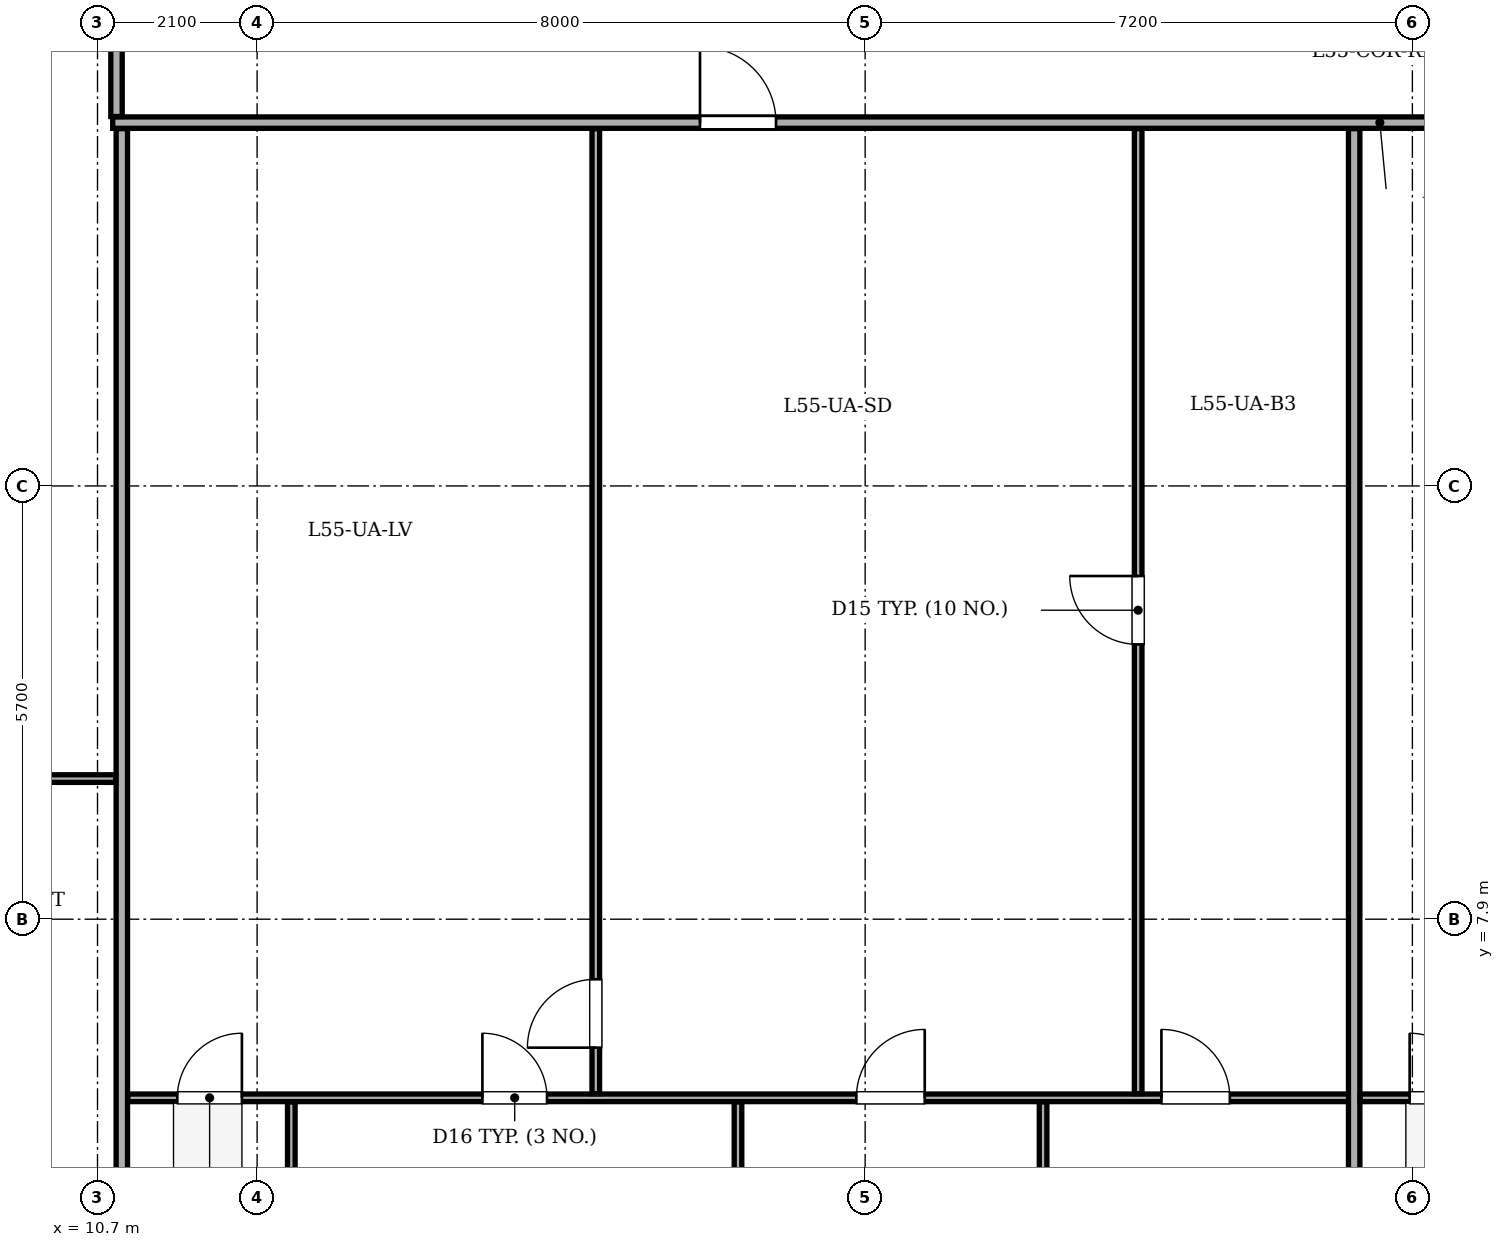
"""IFC4 building model, lengths in metres.
Left out: names, types, materials, properties, quantities, classifications, styles, units other than length and angle.
Written with IfcOpenShell. Run it as: python <this file> out.ifc"""

import sys

from ifc_helpers import new_model, si_unit, direction, frame, frame_2d, origin, place, context, subcontext, project, spatial, rectangle, extrude, element, fill, save


model = new_model("IFC4")
c1 = context("Model", 3, precision=1e-05, world=origin(), true_north=direction((0.0, 1.0)))
c2 = subcontext(c1, "Body", "Model", "MODEL_VIEW")
j1 = project(units=[si_unit("LENGTHUNIT", "METRE"), si_unit("PLANEANGLEUNIT", "RADIAN")], contexts=[c1])
p1 = place(None, origin())
s1 = spatial("IfcSite", under=j1, at=p1, CompositionType="ELEMENT")
p2 = place(p1, origin())
s2 = spatial("IfcBuilding", under=s1, at=p2, CompositionType="ELEMENT")
p3 = place(p2, frame((0.0, 0.0, 214.3)))
s3 = spatial("IfcBuildingStorey", under=s2, at=p3, CompositionType="ELEMENT", Elevation=214.3)
p4 = place(p3, frame((10.9, 18.38, 0.0), z_axis=(0.0, 0.0, 1.0), x_axis=(1.0, 0.0, 0.0)))
e1 = element("IfcWall", 1, at=p4, inside=s3, PredefinedType="PARTITIONING", context=c2, shape_type="SweptSolid", body=[
    extrude(rectangle(XDim=34.02, YDim=0.15, at=frame_2d((17.01, 0.0))), origin(), (0.0, 0.0, 1.0), 3.1),
])
p5 = place(p4, frame((7.727, 0.0, 0.0)))
e2 = element("IfcOpeningElement", 2, at=p5, cuts=e1, PredefinedType="OPENING", context=c2, shape_type="SweptSolid", body=[
    extrude(rectangle(XDim=1.0, YDim=2.1, at=frame_2d((0.5, 1.05))), frame((0.0, 0.085, 0.0), z_axis=(0.0, -1.0, 0.0), x_axis=(1.0, 0.0, 0.0)), (0.0, 0.0, 1.0), 0.17),
])
p6 = place(p4, frame((24.617, 0.0, 0.0)))
e3 = element("IfcOpeningElement", 3, at=p6, cuts=e1, PredefinedType="OPENING", context=c2, shape_type="SweptSolid", body=[
    extrude(rectangle(XDim=1.0, YDim=2.1, at=frame_2d((0.5, 1.05))), frame((0.0, 0.085, 0.0), z_axis=(0.0, -1.0, 0.0), x_axis=(1.0, 0.0, 0.0)), (0.0, 0.0, 1.0), 0.17),
])
p7 = place(p3, frame((11.02, 3.045, 0.0), z_axis=(0.0, 0.0, 1.0), x_axis=(0.0, 1.0, 0.0)))
e4 = element("IfcWall", 4, at=p7, inside=s3, PredefinedType="PARTITIONING", context=c2, shape_type="SweptSolid", body=[
    extrude(rectangle(XDim=15.255, YDim=0.15, at=frame_2d((7.627, 0.0))), origin(), (0.0, 0.0, 1.0), 3.1),
])
p8 = place(p3, frame((11.1, 5.55, 0.0), z_axis=(0.0, 0.0, 1.0), x_axis=(1.0, 0.0, 0.0)))
e5 = element("IfcWall", 5, at=p8, inside=s3, PredefinedType="PARTITIONING", context=c2, shape_type="SweptSolid", body=[
    extrude(rectangle(XDim=16.174, YDim=0.1, at=frame_2d((8.087, 0.0))), origin(), (0.0, 0.0, 1.0), 3.1),
])
p9 = place(p8, frame((0.65, 0.0, 0.0)))
e6 = element("IfcOpeningElement", 6, at=p9, cuts=e5, PredefinedType="OPENING", context=c2, shape_type="SweptSolid", body=[
    extrude(rectangle(XDim=0.85, YDim=2.05, at=frame_2d((0.425, 1.025))), frame((0.0, 0.06, 0.0), z_axis=(0.0, -1.0, 0.0), x_axis=(1.0, 0.0, 0.0)), (0.0, 0.0, 1.0), 0.12),
])
p10 = place(p8, frame((4.664, 0.0, 0.0)))
e7 = element("IfcOpeningElement", 7, at=p10, cuts=e5, PredefinedType="OPENING", context=c2, shape_type="SweptSolid", body=[
    extrude(rectangle(XDim=0.85, YDim=2.05, at=frame_2d((0.425, 1.025))), frame((0.0, 0.06, 0.0), z_axis=(0.0, -1.0, 0.0), x_axis=(1.0, 0.0, 0.0)), (0.0, 0.0, 1.0), 0.12),
])
p11 = place(p8, frame((9.584, 0.0, 0.0)))
e8 = element("IfcOpeningElement", 8, at=p11, cuts=e5, PredefinedType="OPENING", context=c2, shape_type="SweptSolid", body=[
    extrude(rectangle(XDim=0.9, YDim=2.05, at=frame_2d((0.45, 1.025))), frame((0.0, 0.06, 0.0), z_axis=(0.0, -1.0, 0.0), x_axis=(1.0, 0.0, 0.0)), (0.0, 0.0, 1.0), 0.12),
])
p12 = place(p8, frame((13.598, 0.0, 0.0)))
e9 = element("IfcOpeningElement", 9, at=p12, cuts=e5, PredefinedType="OPENING", context=c2, shape_type="SweptSolid", body=[
    extrude(rectangle(XDim=0.9, YDim=2.05, at=frame_2d((0.45, 1.025))), frame((0.0, 0.06, 0.0), z_axis=(0.0, -1.0, 0.0), x_axis=(1.0, 0.0, 0.0)), (0.0, 0.0, 1.0), 0.12),
])
p13 = place(p3, frame((24.392, 5.605, 0.0), z_axis=(0.0, 0.0, 1.0), x_axis=(0.0, 1.0, 0.0)))
e10 = element("IfcWall", 10, at=p13, inside=s3, PredefinedType="PARTITIONING", context=c2, shape_type="SweptSolid", body=[
    extrude(rectangle(XDim=12.695, YDim=0.1, at=frame_2d((6.348, 0.0))), origin(), (0.0, 0.0, 1.0), 3.1),
])
p14 = place(p13, frame((5.91, 0.0, 0.0)))
e11 = element("IfcOpeningElement", 11, at=p14, cuts=e10, PredefinedType="OPENING", context=c2, shape_type="SweptSolid", body=[
    extrude(rectangle(XDim=0.9, YDim=2.05, at=frame_2d((0.45, 1.025))), frame((0.0, 0.06, 0.0), z_axis=(0.0, -1.0, 0.0), x_axis=(1.0, 0.0, 0.0)), (0.0, 0.0, 1.0), 0.12),
])
p15 = place(p3, frame((17.256, 5.605, 0.0), z_axis=(0.0, 0.0, 1.0), x_axis=(0.0, 1.0, 0.0)))
e12 = element("IfcWall", 12, at=p15, inside=s3, PredefinedType="PARTITIONING", context=c2, shape_type="SweptSolid", body=[
    extrude(rectangle(XDim=12.695, YDim=0.1, at=frame_2d((6.348, 0.0))), origin(), (0.0, 0.0, 1.0), 3.1),
])
p16 = place(p15, frame((0.605, 0.0, 0.0)))
e13 = element("IfcOpeningElement", 13, at=p16, cuts=e12, PredefinedType="OPENING", context=c2, shape_type="SweptSolid", body=[
    extrude(rectangle(XDim=0.9, YDim=2.05, at=frame_2d((0.45, 1.025))), frame((0.0, 0.06, 0.0), z_axis=(0.0, -1.0, 0.0), x_axis=(1.0, 0.0, 0.0)), (0.0, 0.0, 1.0), 0.12),
])
for number, where, z_axis, x_axis in (
    (14, (13.25, 3.045, 0.0), (0.0, 0.0, 1.0), (0.0, 1.0, 0.0)),
    (15, (19.127, 3.045, 0.0), (0.0, 0.0, 1.0), (0.0, 1.0, 0.0)),
    (16, (23.141, 3.045, 0.0), (0.0, 0.0, 1.0), (0.0, 1.0, 0.0)),
):
    element("IfcWall", number, at=place(p3, frame(where, z_axis=z_axis, x_axis=x_axis)), inside=s3, PredefinedType="PARTITIONING", context=c2, shape_type="SweptSolid", body=[
        extrude(rectangle(XDim=2.45, YDim=0.1, at=frame_2d((1.225, 0.0))), origin(), (0.0, 0.0, 1.0), 3.1),
    ])
p17 = place(p3, frame((27.234, 3.045, 0.0), z_axis=(0.0, 0.0, 1.0), x_axis=(0.0, 1.0, 0.0)))
e17 = element("IfcWall", 17, at=p17, inside=s3, PredefinedType="PARTITIONING", context=c2, shape_type="SweptSolid", body=[
    extrude(rectangle(XDim=15.255, YDim=0.15, at=frame_2d((7.627, 0.0))), origin(), (0.0, 0.0, 1.0), 3.1),
])
p18 = place(p3, frame((27.314, 5.55, 0.0), z_axis=(0.0, 0.0, 1.0), x_axis=(1.0, 0.0, 0.0)))
e18 = element("IfcWall", 18, at=p18, inside=s3, PredefinedType="PARTITIONING", context=c2, shape_type="SweptSolid", body=[
    extrude(rectangle(XDim=17.526, YDim=0.1, at=frame_2d((8.763, 0.0))), origin(), (0.0, 0.0, 1.0), 3.1),
])
p19 = place(p18, frame((0.65, 0.0, 0.0)))
e19 = element("IfcOpeningElement", 19, at=p19, cuts=e18, PredefinedType="OPENING", context=c2, shape_type="SweptSolid", body=[
    extrude(rectangle(XDim=0.85, YDim=2.05, at=frame_2d((0.425, 1.025))), frame((0.0, 0.06, 0.0), z_axis=(0.0, -1.0, 0.0), x_axis=(1.0, 0.0, 0.0)), (0.0, 0.0, 1.0), 0.12),
])
p20 = place(p18, frame((5.001, 0.0, 0.0)))
e20 = element("IfcOpeningElement", 20, at=p20, cuts=e18, PredefinedType="OPENING", context=c2, shape_type="SweptSolid", body=[
    extrude(rectangle(XDim=0.85, YDim=2.05, at=frame_2d((0.425, 1.025))), frame((0.0, 0.06, 0.0), z_axis=(0.0, -1.0, 0.0), x_axis=(1.0, 0.0, 0.0)), (0.0, 0.0, 1.0), 0.12),
])
p21 = place(p18, frame((10.428, 0.0, 0.0)))
e21 = element("IfcOpeningElement", 21, at=p21, cuts=e18, PredefinedType="OPENING", context=c2, shape_type="SweptSolid", body=[
    extrude(rectangle(XDim=0.9, YDim=2.05, at=frame_2d((0.45, 1.025))), frame((0.0, 0.06, 0.0), z_axis=(0.0, -1.0, 0.0), x_axis=(1.0, 0.0, 0.0)), (0.0, 0.0, 1.0), 0.12),
])
p22 = place(p18, frame((14.78, 0.0, 0.0)))
e22 = element("IfcOpeningElement", 22, at=p22, cuts=e18, PredefinedType="OPENING", context=c2, shape_type="SweptSolid", body=[
    extrude(rectangle(XDim=0.9, YDim=2.05, at=frame_2d((0.45, 1.025))), frame((0.0, 0.06, 0.0), z_axis=(0.0, -1.0, 0.0), x_axis=(1.0, 0.0, 0.0)), (0.0, 0.0, 1.0), 0.12),
])
p23 = place(p3, frame((10.95, 18.46, 0.0), z_axis=(0.0, 0.0, 1.0), x_axis=(0.0, 1.0, 0.0)))
e23 = element("IfcWall", 23, at=p23, inside=s3, PredefinedType="PARTITIONING", context=c2, shape_type="SweptSolid", body=[
    extrude(rectangle(XDim=1.79, YDim=0.15, at=frame_2d((0.895, 0.0))), origin(), (0.0, 0.0, 1.0), 3.1),
])
p24 = place(p3, frame((4.645, 9.75, 0.0), z_axis=(0.0, 0.0, 1.0), x_axis=(1.0, 0.0, 0.0)))
e24 = element("IfcWall", 24, at=p24, inside=s3, PredefinedType="PARTITIONING", context=c2, shape_type="SweptSolid", body=[
    extrude(rectangle(XDim=6.295, YDim=0.1, at=frame_2d((3.147, 0.0))), origin(), (0.0, 0.0, 1.0), 3.1),
])
p25 = place(p24, frame((0.472, 0.0, 0.0)))
e25 = element("IfcOpeningElement", 25, at=p25, cuts=e24, PredefinedType="OPENING", context=c2, shape_type="SweptSolid", body=[
    extrude(rectangle(XDim=0.85, YDim=2.05, at=frame_2d((0.425, 1.025))), frame((0.0, 0.06, 0.0), z_axis=(0.0, -1.0, 0.0), x_axis=(1.0, 0.0, 0.0)), (0.0, 0.0, 1.0), 0.12),
])
p26 = place(p24, frame((2.092, 0.0, 0.0)))
e26 = element("IfcOpeningElement", 26, at=p26, cuts=e24, PredefinedType="OPENING", context=c2, shape_type="SweptSolid", body=[
    extrude(rectangle(XDim=0.85, YDim=2.05, at=frame_2d((0.425, 1.025))), frame((0.0, 0.06, 0.0), z_axis=(0.0, -1.0, 0.0), x_axis=(1.0, 0.0, 0.0)), (0.0, 0.0, 1.0), 0.12),
])
p27 = place(p24, frame((4.285, 0.0, 0.0)))
e27 = element("IfcOpeningElement", 27, at=p27, cuts=e24, PredefinedType="OPENING", context=c2, shape_type="SweptSolid", body=[
    extrude(rectangle(XDim=0.9, YDim=2.05, at=frame_2d((0.45, 1.025))), frame((0.0, 0.06, 0.0), z_axis=(0.0, -1.0, 0.0), x_axis=(1.0, 0.0, 0.0)), (0.0, 0.0, 1.0), 0.12),
])
p28 = place(p5, origin())
e28 = element("IfcDoor", 28, at=p28, inside=s3, OperationType="SINGLE_SWING_LEFT", PredefinedType="DOOR", context=c2, shape_type="SweptSolid", body=[
    extrude(rectangle(XDim=1.0, YDim=2.1, at=frame_2d((0.5, 1.05))), frame((0.0, 0.025, 0.0), z_axis=(0.0, -1.0, 0.0), x_axis=(1.0, 0.0, 0.0)), (0.0, 0.0, 1.0), 0.05),
])
fill(e2, e28)
p29 = place(p14, origin())
e29 = element("IfcDoor", 29, at=p29, inside=s3, OperationType="SINGLE_SWING_RIGHT", PredefinedType="DOOR", context=c2, shape_type="SweptSolid", body=[
    extrude(rectangle(XDim=0.9, YDim=2.05, at=frame_2d((0.45, 1.025))), frame((0.0, 0.025, 0.0), z_axis=(0.0, -1.0, 0.0), x_axis=(1.0, 0.0, 0.0)), (0.0, 0.0, 1.0), 0.05),
])
fill(e11, e29)
p30 = place(p16, origin())
e30 = element("IfcDoor", 30, at=p30, inside=s3, OperationType="SINGLE_SWING_LEFT", PredefinedType="DOOR", context=c2, shape_type="SweptSolid", body=[
    extrude(rectangle(XDim=0.9, YDim=2.05, at=frame_2d((0.45, 1.025))), frame((0.0, 0.025, 0.0), z_axis=(0.0, -1.0, 0.0), x_axis=(1.0, 0.0, 0.0)), (0.0, 0.0, 1.0), 0.05),
])
fill(e13, e30)
p31 = place(p9, origin())
e31 = element("IfcDoor", 31, at=p31, inside=s3, OperationType="SINGLE_SWING_RIGHT", PredefinedType="DOOR", context=c2, shape_type="SweptSolid", body=[
    extrude(rectangle(XDim=0.85, YDim=2.05, at=frame_2d((0.425, 1.025))), frame((0.0, 0.025, 0.0), z_axis=(0.0, -1.0, 0.0), x_axis=(1.0, 0.0, 0.0)), (0.0, 0.0, 1.0), 0.05),
])
fill(e6, e31)
p32 = place(p10, origin())
e32 = element("IfcDoor", 32, at=p32, inside=s3, OperationType="SINGLE_SWING_LEFT", PredefinedType="DOOR", context=c2, shape_type="SweptSolid", body=[
    extrude(rectangle(XDim=0.85, YDim=2.05, at=frame_2d((0.425, 1.025))), frame((0.0, 0.025, 0.0), z_axis=(0.0, -1.0, 0.0), x_axis=(1.0, 0.0, 0.0)), (0.0, 0.0, 1.0), 0.05),
])
fill(e7, e32)
p33 = place(p11, origin())
e33 = element("IfcDoor", 33, at=p33, inside=s3, OperationType="SINGLE_SWING_RIGHT", PredefinedType="DOOR", context=c2, shape_type="SweptSolid", body=[
    extrude(rectangle(XDim=0.9, YDim=2.05, at=frame_2d((0.45, 1.025))), frame((0.0, 0.025, 0.0), z_axis=(0.0, -1.0, 0.0), x_axis=(1.0, 0.0, 0.0)), (0.0, 0.0, 1.0), 0.05),
])
fill(e8, e33)
p34 = place(p12, origin())
e34 = element("IfcDoor", 34, at=p34, inside=s3, OperationType="SINGLE_SWING_LEFT", PredefinedType="DOOR", context=c2, shape_type="SweptSolid", body=[
    extrude(rectangle(XDim=0.9, YDim=2.05, at=frame_2d((0.45, 1.025))), frame((0.0, 0.025, 0.0), z_axis=(0.0, -1.0, 0.0), x_axis=(1.0, 0.0, 0.0)), (0.0, 0.0, 1.0), 0.05),
])
fill(e9, e34)
p35 = place(p19, origin())
e35 = element("IfcDoor", 35, at=p35, inside=s3, OperationType="SINGLE_SWING_LEFT", PredefinedType="DOOR", context=c2, shape_type="SweptSolid", body=[
    extrude(rectangle(XDim=0.85, YDim=2.05, at=frame_2d((0.425, 1.025))), frame((0.0, 0.025, 0.0), z_axis=(0.0, -1.0, 0.0), x_axis=(1.0, 0.0, 0.0)), (0.0, 0.0, 1.0), 0.05),
])
fill(e19, e35)
save(model, sys.argv[1])
